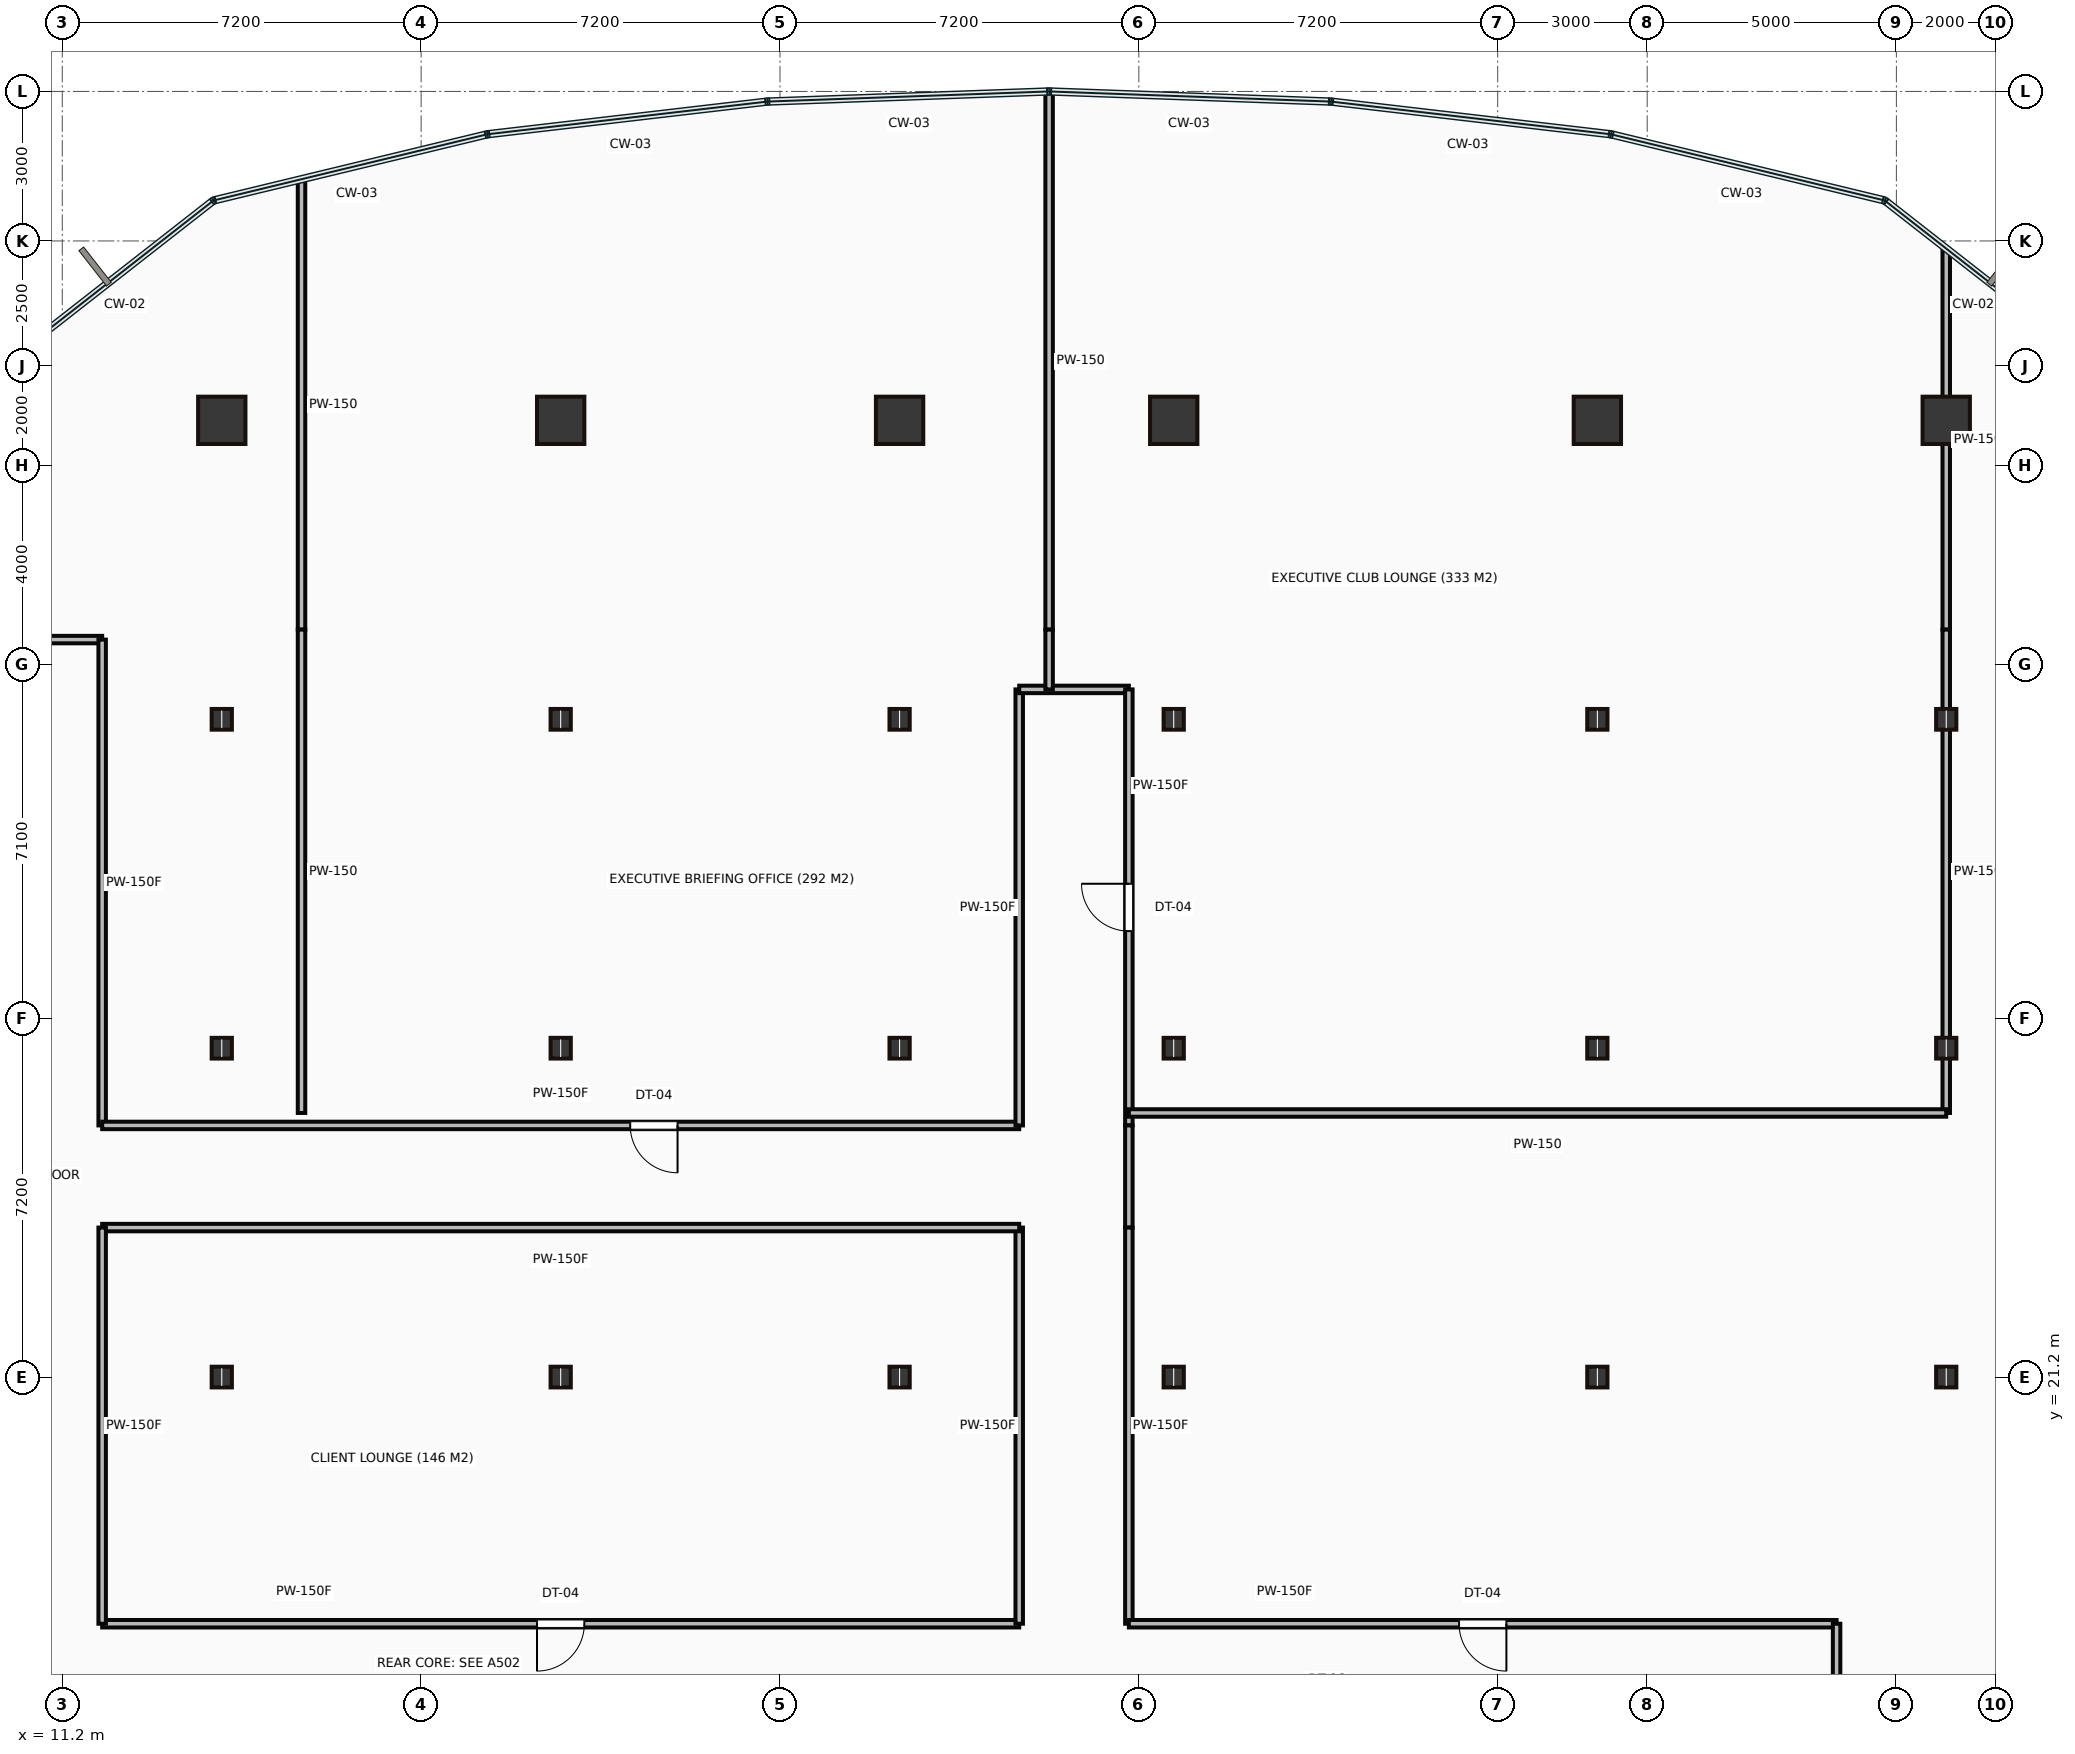
"""IFC4 building model, lengths in metres.
Left out: names, types, materials, properties, quantities, classifications, styles, units other than length and angle.
Written with IfcOpenShell. Run it as: python <this file> out.ifc"""

import sys

from ifc_helpers import new_model, si_unit, direction, frame, frame_2d, origin, origin_2d, place, context, subcontext, project, spatial, rectangle, hollow_rectangle, i_section, extrude, source, transform, mapped, element, fill, save


model = new_model("IFC4")
c1 = context("Model", 3, precision=1e-05, world=origin(), true_north=direction((0.0, 1.0)))
c2 = subcontext(c1, "Body", "Model", "MODEL_VIEW")
j1 = project(units=[si_unit("LENGTHUNIT", "METRE"), si_unit("PLANEANGLEUNIT", "RADIAN")], contexts=[c1])
p1 = place(None, origin())
s1 = spatial("IfcSite", under=j1, at=p1, CompositionType="ELEMENT")
p2 = place(p1, origin())
s2 = spatial("IfcBuilding", under=s1, at=p2, CompositionType="ELEMENT")
p3 = place(p2, frame((0.0, 0.0, 43.45)))
s3 = spatial("IfcBuildingStorey", under=s2, at=p3, CompositionType="ELEMENT", Elevation=43.45)
m1 = source(origin(), c2, "Body", "SweptSolid", [
    extrude(i_section(OverallWidth=0.406, OverallDepth=0.416, WebThickness=0.03, FlangeThickness=0.048, at=origin_2d()), origin(), (0.0, 0.0, 1.0), 3.65),
])
for number, where, z_axis, x_axis in (
    (1, (14.4, 21.2, 0.0), (0.0, 0.0, 1.0), (1.0, 0.0, 0.0)),
    (2, (14.4, 27.8, 0.0), (0.0, 0.0, 1.0), (1.0, 0.0, 0.0)),
    (3, (14.4, 34.4, 0.0), (0.0, 0.0, 1.0), (1.0, 0.0, 0.0)),
):
    element("IfcColumn", number, at=place(p3, frame(where, z_axis=z_axis, x_axis=x_axis)), inside=s3, PredefinedType="COLUMN", context=c2, shape_type="MappedRepresentation", body=[
        mapped(m1, transform((0.0, 0.0, 0.0))),
    ])
m2 = source(origin(), c2, "Body", "SweptSolid", [
    extrude(hollow_rectangle(XDim=0.95, YDim=0.95, WallThickness=0.045, at=origin_2d()), origin(), (0.0, 0.0, 1.0), 3.65),
])
p4 = place(p3, frame((14.4, 40.4, 0.0), z_axis=(0.0, 0.0, 1.0), x_axis=(1.0, 0.0, 0.0)))
e4 = element("IfcColumn", 4, at=p4, inside=s3, PredefinedType="COLUMN", context=c2, shape_type="MappedRepresentation", body=[
    mapped(m2, transform((0.0, 0.0, 0.0))),
])
for number, where, z_axis, x_axis in (
    (5, (21.2, 21.2, 0.0), (0.0, 0.0, 1.0), (1.0, 0.0, 0.0)),
    (6, (21.2, 27.8, 0.0), (0.0, 0.0, 1.0), (1.0, 0.0, 0.0)),
    (7, (21.2, 34.4, 0.0), (0.0, 0.0, 1.0), (1.0, 0.0, 0.0)),
):
    element("IfcColumn", number, at=place(p3, frame(where, z_axis=z_axis, x_axis=x_axis)), inside=s3, PredefinedType="COLUMN", context=c2, shape_type="MappedRepresentation", body=[
        mapped(m1, transform((0.0, 0.0, 0.0))),
    ])
p5 = place(p3, frame((21.2, 40.4, 0.0), z_axis=(0.0, 0.0, 1.0), x_axis=(1.0, 0.0, 0.0)))
e8 = element("IfcColumn", 8, at=p5, inside=s3, PredefinedType="COLUMN", context=c2, shape_type="MappedRepresentation", body=[
    mapped(m2, transform((0.0, 0.0, 0.0))),
])
for number, where, z_axis, x_axis in (
    (9, (28.0, 21.2, 0.0), (0.0, 0.0, 1.0), (1.0, 0.0, 0.0)),
    (10, (28.0, 27.8, 0.0), (0.0, 0.0, 1.0), (1.0, 0.0, 0.0)),
    (11, (28.0, 34.4, 0.0), (0.0, 0.0, 1.0), (1.0, 0.0, 0.0)),
):
    element("IfcColumn", number, at=place(p3, frame(where, z_axis=z_axis, x_axis=x_axis)), inside=s3, PredefinedType="COLUMN", context=c2, shape_type="MappedRepresentation", body=[
        mapped(m1, transform((0.0, 0.0, 0.0))),
    ])
p6 = place(p3, frame((28.0, 40.4, 0.0), z_axis=(0.0, 0.0, 1.0), x_axis=(1.0, 0.0, 0.0)))
e12 = element("IfcColumn", 12, at=p6, inside=s3, PredefinedType="COLUMN", context=c2, shape_type="MappedRepresentation", body=[
    mapped(m2, transform((0.0, 0.0, 0.0))),
])
for number, where, z_axis, x_axis in (
    (13, (33.5, 21.2, 0.0), (0.0, 0.0, 1.0), (1.0, 0.0, 0.0)),
    (14, (33.5, 27.8, 0.0), (0.0, 0.0, 1.0), (1.0, 0.0, 0.0)),
    (15, (33.5, 34.4, 0.0), (0.0, 0.0, 1.0), (1.0, 0.0, 0.0)),
):
    element("IfcColumn", number, at=place(p3, frame(where, z_axis=z_axis, x_axis=x_axis)), inside=s3, PredefinedType="COLUMN", context=c2, shape_type="MappedRepresentation", body=[
        mapped(m1, transform((0.0, 0.0, 0.0))),
    ])
p7 = place(p3, frame((33.5, 40.4, 0.0), z_axis=(0.0, 0.0, 1.0), x_axis=(1.0, 0.0, 0.0)))
e16 = element("IfcColumn", 16, at=p7, inside=s3, PredefinedType="COLUMN", context=c2, shape_type="MappedRepresentation", body=[
    mapped(m2, transform((0.0, 0.0, 0.0))),
])
for number, where, z_axis, x_axis in (
    (17, (42.0, 21.2, 0.0), (0.0, 0.0, 1.0), (1.0, 0.0, 0.0)),
    (18, (42.0, 27.8, 0.0), (0.0, 0.0, 1.0), (1.0, 0.0, 0.0)),
    (19, (42.0, 34.4, 0.0), (0.0, 0.0, 1.0), (1.0, 0.0, 0.0)),
):
    element("IfcColumn", number, at=place(p3, frame(where, z_axis=z_axis, x_axis=x_axis)), inside=s3, PredefinedType="COLUMN", context=c2, shape_type="MappedRepresentation", body=[
        mapped(m1, transform((0.0, 0.0, 0.0))),
    ])
p8 = place(p3, frame((42.0, 40.4, 0.0), z_axis=(0.0, 0.0, 1.0), x_axis=(1.0, 0.0, 0.0)))
e20 = element("IfcColumn", 20, at=p8, inside=s3, PredefinedType="COLUMN", context=c2, shape_type="MappedRepresentation", body=[
    mapped(m2, transform((0.0, 0.0, 0.0))),
])
for number, where, z_axis, x_axis in (
    (21, (49.0, 21.2, 0.0), (0.0, 0.0, 1.0), (1.0, 0.0, 0.0)),
    (22, (49.0, 27.8, 0.0), (0.0, 0.0, 1.0), (1.0, 0.0, 0.0)),
    (23, (49.0, 34.4, 0.0), (0.0, 0.0, 1.0), (1.0, 0.0, 0.0)),
):
    element("IfcColumn", number, at=place(p3, frame(where, z_axis=z_axis, x_axis=x_axis)), inside=s3, PredefinedType="COLUMN", context=c2, shape_type="MappedRepresentation", body=[
        mapped(m1, transform((0.0, 0.0, 0.0))),
    ])
p9 = place(p3, frame((49.0, 40.4, 0.0), z_axis=(0.0, 0.0, 1.0), x_axis=(1.0, 0.0, 0.0)))
e24 = element("IfcColumn", 24, at=p9, inside=s3, PredefinedType="COLUMN", context=c2, shape_type="MappedRepresentation", body=[
    mapped(m2, transform((0.0, 0.0, 0.0))),
])
m3 = source(origin(), c2, "Body", "SweptSolid", [
    extrude(rectangle(XDim=2.2, YDim=0.15, at=frame_2d((1.1, 0.0))), origin(), (0.0, 0.0, 1.0), 3.4),
])
p10 = place(p3, frame((9.8, 36.0, 0.0), z_axis=(0.0, 0.0, 1.0), x_axis=(1.0, 0.0, 0.0)))
e25 = element("IfcWall", 25, at=p10, inside=s3, PredefinedType="PARTITIONING", context=c2, shape_type="MappedRepresentation", body=[
    mapped(m3, transform((0.0, 0.0, 0.0))),
])
m4 = source(origin(), c2, "Body", "SweptSolid", [
    extrude(rectangle(XDim=9.75, YDim=0.15, at=frame_2d((4.875, 0.0))), origin(), (0.0, 0.0, 1.0), 3.4),
])
p11 = place(p3, frame((12.0, 36.0, 0.0), z_axis=(0.0, 0.0, 1.0), x_axis=(0.0, -1.0, 0.0)))
e26 = element("IfcWall", 26, at=p11, inside=s3, PredefinedType="PARTITIONING", context=c2, shape_type="MappedRepresentation", body=[
    mapped(m4, transform((0.0, 0.0, 0.0))),
])
m5 = source(origin(), c2, "Body", "SweptSolid", [
    extrude(rectangle(XDim=18.4, YDim=0.15, at=frame_2d((9.2, 0.0))), origin(), (0.0, 0.0, 1.0), 3.4),
])
p12 = place(p3, frame((12.0, 26.25, 0.0), z_axis=(0.0, 0.0, 1.0), x_axis=(1.0, 0.0, 0.0)))
e27 = element("IfcWall", 27, at=p12, inside=s3, PredefinedType="PARTITIONING", context=c2, shape_type="MappedRepresentation", body=[
    mapped(m5, transform((0.0, 0.0, 0.0))),
])
p13 = place(p12, frame((10.595, 0.0, 0.0)))
e28 = element("IfcOpeningElement", 28, at=p13, cuts=e27, PredefinedType="OPENING", context=c2, shape_type="SweptSolid", body=[
    extrude(rectangle(XDim=0.95, YDim=2.15, at=frame_2d((0.475, 1.075))), frame((0.0, 0.085, 0.0), z_axis=(0.0, -1.0, 0.0), x_axis=(1.0, 0.0, 0.0)), (0.0, 0.0, 1.0), 0.17),
])
m6 = source(origin(), c2, "Body", "SweptSolid", [
    extrude(rectangle(XDim=8.75, YDim=0.15, at=frame_2d((4.375, 0.0))), origin(), (0.0, 0.0, 1.0), 3.4),
])
p14 = place(p3, frame((30.4, 26.25, 0.0), z_axis=(0.0, 0.0, 1.0), x_axis=(0.0, 1.0, 0.0)))
e29 = element("IfcWall", 29, at=p14, inside=s3, PredefinedType="PARTITIONING", context=c2, shape_type="MappedRepresentation", body=[
    mapped(m6, transform((0.0, 0.0, 0.0))),
])
m7 = source(origin(), c2, "Body", "SweptSolid", [
    extrude(rectangle(XDim=2.2, YDim=0.15, at=frame_2d((1.1, 0.0))), origin(), (0.0, 0.0, 1.0), 3.4),
])
p15 = place(p3, frame((30.4, 35.0, 0.0), z_axis=(0.0, 0.0, 1.0), x_axis=(1.0, 0.0, 0.0)))
e30 = element("IfcWall", 30, at=p15, inside=s3, PredefinedType="PARTITIONING", context=c2, shape_type="MappedRepresentation", body=[
    mapped(m7, transform((0.0, 0.0, 0.0))),
])
p16 = place(p3, frame((32.6, 35.0, 0.0), z_axis=(0.0, 0.0, 1.0), x_axis=(0.0, -1.0, 0.0)))
e31 = element("IfcWall", 31, at=p16, inside=s3, PredefinedType="PARTITIONING", context=c2, shape_type="MappedRepresentation", body=[
    mapped(m6, transform((0.0, 0.0, 0.0))),
])
p17 = place(p16, frame((3.9, 0.0, 0.0)))
e32 = element("IfcOpeningElement", 32, at=p17, cuts=e31, PredefinedType="OPENING", context=c2, shape_type="SweptSolid", body=[
    extrude(rectangle(XDim=0.95, YDim=2.15, at=frame_2d((0.475, 1.075))), frame((0.0, 0.085, 0.0), z_axis=(0.0, -1.0, 0.0), x_axis=(1.0, 0.0, 0.0)), (0.0, 0.0, 1.0), 0.17),
])
m8 = source(origin(), c2, "Body", "SweptSolid", [
    extrude(rectangle(XDim=2.05, YDim=0.15, at=frame_2d((1.025, 0.0))), origin(), (0.0, 0.0, 1.0), 3.4),
])
p18 = place(p3, frame((32.6, 26.25, 0.0), z_axis=(0.0, 0.0, 1.0), x_axis=(0.0, -1.0, 0.0)))
e33 = element("IfcWall", 33, at=p18, inside=s3, PredefinedType="PARTITIONING", context=c2, shape_type="MappedRepresentation", body=[
    mapped(m8, transform((0.0, 0.0, 0.0))),
])
m9 = source(origin(), c2, "Body", "SweptSolid", [
    extrude(rectangle(XDim=7.95, YDim=0.15, at=frame_2d((3.975, 0.0))), origin(), (0.0, 0.0, 1.0), 3.4),
])
p19 = place(p3, frame((32.6, 24.2, 0.0), z_axis=(0.0, 0.0, 1.0), x_axis=(0.0, -1.0, 0.0)))
e34 = element("IfcWall", 34, at=p19, inside=s3, PredefinedType="PARTITIONING", context=c2, shape_type="MappedRepresentation", body=[
    mapped(m9, transform((0.0, 0.0, 0.0))),
])
m10 = source(origin(), c2, "Body", "SweptSolid", [
    extrude(rectangle(XDim=14.2, YDim=0.15, at=frame_2d((7.1, 0.0))), origin(), (0.0, 0.0, 1.0), 3.4),
])
p20 = place(p3, frame((32.6, 16.25, 0.0), z_axis=(0.0, 0.0, 1.0), x_axis=(1.0, 0.0, 0.0)))
e35 = element("IfcWall", 35, at=p20, inside=s3, PredefinedType="PARTITIONING", context=c2, shape_type="MappedRepresentation", body=[
    mapped(m10, transform((0.0, 0.0, 0.0))),
])
p21 = place(p20, frame((6.625, 0.0, 0.0)))
e36 = element("IfcOpeningElement", 36, at=p21, cuts=e35, PredefinedType="OPENING", context=c2, shape_type="SweptSolid", body=[
    extrude(rectangle(XDim=0.95, YDim=2.15, at=frame_2d((0.475, 1.075))), frame((0.0, 0.085, 0.0), z_axis=(0.0, -1.0, 0.0), x_axis=(1.0, 0.0, 0.0)), (0.0, 0.0, 1.0), 0.17),
])
m11 = source(origin(), c2, "Body", "SweptSolid", [
    extrude(rectangle(XDim=2.25, YDim=0.15, at=frame_2d((1.125, 0.0))), origin(), (0.0, 0.0, 1.0), 3.4),
])
p22 = place(p3, frame((46.8, 16.25, 0.0), z_axis=(0.0, 0.0, 1.0), x_axis=(0.0, -1.0, 0.0)))
e37 = element("IfcWall", 37, at=p22, inside=s3, PredefinedType="PARTITIONING", context=c2, shape_type="MappedRepresentation", body=[
    mapped(m11, transform((0.0, 0.0, 0.0))),
])
p23 = place(p3, frame((12.0, 16.25, 0.0), z_axis=(0.0, 0.0, 1.0), x_axis=(1.0, 0.0, 0.0)))
e38 = element("IfcWall", 38, at=p23, inside=s3, PredefinedType="PARTITIONING", context=c2, shape_type="MappedRepresentation", body=[
    mapped(m5, transform((0.0, 0.0, 0.0))),
])
p24 = place(p23, frame((8.725, 0.0, 0.0)))
e39 = element("IfcOpeningElement", 39, at=p24, cuts=e38, PredefinedType="OPENING", context=c2, shape_type="SweptSolid", body=[
    extrude(rectangle(XDim=0.95, YDim=2.15, at=frame_2d((0.475, 1.075))), frame((0.0, 0.085, 0.0), z_axis=(0.0, -1.0, 0.0), x_axis=(1.0, 0.0, 0.0)), (0.0, 0.0, 1.0), 0.17),
])
p25 = place(p3, frame((30.4, 16.25, 0.0), z_axis=(0.0, 0.0, 1.0), x_axis=(0.0, 1.0, 0.0)))
e40 = element("IfcWall", 40, at=p25, inside=s3, PredefinedType="PARTITIONING", context=c2, shape_type="MappedRepresentation", body=[
    mapped(m9, transform((0.0, 0.0, 0.0))),
])
p26 = place(p3, frame((30.4, 24.2, 0.0), z_axis=(0.0, 0.0, 1.0), x_axis=(-1.0, 0.0, 0.0)))
e41 = element("IfcWall", 41, at=p26, inside=s3, PredefinedType="PARTITIONING", context=c2, shape_type="MappedRepresentation", body=[
    mapped(m5, transform((0.0, 0.0, 0.0))),
])
p27 = place(p3, frame((12.0, 24.2, 0.0), z_axis=(0.0, 0.0, 1.0), x_axis=(0.0, -1.0, 0.0)))
e42 = element("IfcWall", 42, at=p27, inside=s3, PredefinedType="PARTITIONING", context=c2, shape_type="MappedRepresentation", body=[
    mapped(m9, transform((0.0, 0.0, 0.0))),
])
m12 = source(origin(), c2, "Body", "SweptSolid", [
    extrude(rectangle(XDim=9.018, YDim=0.15, at=frame_2d((4.509, 0.0))), origin(), (0.0, 0.0, 1.0), 3.4),
])
p28 = place(p3, frame((16.0, 45.218, 0.0), z_axis=(0.0, 0.0, 1.0), x_axis=(0.0, -1.0, 0.0)))
e43 = element("IfcWall", 43, at=p28, inside=s3, PredefinedType="PARTITIONING", context=c2, shape_type="MappedRepresentation", body=[
    mapped(m12, transform((0.0, 0.0, 0.0))),
])
m13 = source(origin(), c2, "Body", "SweptSolid", [
    extrude(rectangle(XDim=9.7, YDim=0.15, at=frame_2d((4.85, 0.0))), origin(), (0.0, 0.0, 1.0), 3.4),
])
p29 = place(p3, frame((16.0, 36.2, 0.0), z_axis=(0.0, 0.0, 1.0), x_axis=(0.0, -1.0, 0.0)))
e44 = element("IfcWall", 44, at=p29, inside=s3, PredefinedType="PARTITIONING", context=c2, shape_type="MappedRepresentation", body=[
    mapped(m13, transform((0.0, 0.0, 0.0))),
])
m14 = source(origin(), c2, "Body", "SweptSolid", [
    extrude(rectangle(XDim=10.78, YDim=0.15, at=frame_2d((5.39, 0.0))), origin(), (0.0, 0.0, 1.0), 3.4),
])
p30 = place(p3, frame((31.0, 46.98, 0.0), z_axis=(0.0, 0.0, 1.0), x_axis=(0.0, -1.0, 0.0)))
e45 = element("IfcWall", 45, at=p30, inside=s3, PredefinedType="PARTITIONING", context=c2, shape_type="MappedRepresentation", body=[
    mapped(m14, transform((0.0, 0.0, 0.0))),
])
m15 = source(origin(), c2, "Body", "SweptSolid", [
    extrude(rectangle(XDim=1.2, YDim=0.15, at=frame_2d((0.6, 0.0))), origin(), (0.0, 0.0, 1.0), 3.4),
])
p31 = place(p3, frame((31.0, 36.2, 0.0), z_axis=(0.0, 0.0, 1.0), x_axis=(0.0, -1.0, 0.0)))
e46 = element("IfcWall", 46, at=p31, inside=s3, PredefinedType="PARTITIONING", context=c2, shape_type="MappedRepresentation", body=[
    mapped(m15, transform((0.0, 0.0, 0.0))),
])
m16 = source(origin(), c2, "Body", "SweptSolid", [
    extrude(rectangle(XDim=7.621, YDim=0.15, at=frame_2d((3.811, 0.0))), origin(), (0.0, 0.0, 1.0), 2.625),
])
p32 = place(p3, frame((49.0, 43.821, 0.0), z_axis=(0.0, 0.0, 1.0), x_axis=(0.0, -1.0, 0.0)))
e47 = element("IfcWall", 47, at=p32, inside=s3, PredefinedType="PARTITIONING", context=c2, shape_type="MappedRepresentation", body=[
    mapped(m16, transform((0.0, 0.0, 0.0))),
])
m17 = source(origin(), c2, "Body", "SweptSolid", [
    extrude(rectangle(XDim=9.7, YDim=0.15, at=frame_2d((4.85, 0.0))), origin(), (0.0, 0.0, 1.0), 2.625),
])
p33 = place(p3, frame((49.0, 36.2, 0.0), z_axis=(0.0, 0.0, 1.0), x_axis=(0.0, -1.0, 0.0)))
e48 = element("IfcWall", 48, at=p33, inside=s3, PredefinedType="PARTITIONING", context=c2, shape_type="MappedRepresentation", body=[
    mapped(m17, transform((0.0, 0.0, 0.0))),
])
m18 = source(origin(), c2, "Body", "SweptSolid", [
    extrude(rectangle(XDim=16.4, YDim=0.15, at=frame_2d((8.2, 0.0))), origin(), (0.0, 0.0, 1.0), 3.4),
])
p34 = place(p3, frame((49.0, 26.5, 0.0), z_axis=(0.0, 0.0, 1.0), x_axis=(-1.0, 0.0, 0.0)))
e49 = element("IfcWall", 49, at=p34, inside=s3, PredefinedType="PARTITIONING", context=c2, shape_type="MappedRepresentation", body=[
    mapped(m18, transform((0.0, 0.0, 0.0))),
])
m19 = source(origin(), c2, "Body", "SweptSolid", [
    extrude(rectangle(XDim=0.95, YDim=2.15, at=frame_2d((0.475, 1.075))), frame((0.0, 0.025, 0.0), z_axis=(0.0, -1.0, 0.0), x_axis=(1.0, 0.0, 0.0)), (0.0, 0.0, 1.0), 0.05),
])
p35 = place(p24, origin())
e50 = element("IfcDoor", 50, at=p35, inside=s3, OperationType="SINGLE_SWING_LEFT", PredefinedType="DOOR", context=c2, shape_type="MappedRepresentation", body=[
    mapped(m19, transform((0.0, 0.0, 0.0))),
])
fill(e39, e50)
p36 = place(p13, origin())
e51 = element("IfcDoor", 51, at=p36, inside=s3, OperationType="SINGLE_SWING_RIGHT", PredefinedType="DOOR", context=c2, shape_type="MappedRepresentation", body=[
    mapped(m19, transform((0.0, 0.0, 0.0))),
])
fill(e28, e51)
p37 = place(p17, origin())
e52 = element("IfcDoor", 52, at=p37, inside=s3, OperationType="SINGLE_SWING_LEFT", PredefinedType="DOOR", context=c2, shape_type="MappedRepresentation", body=[
    mapped(m19, transform((0.0, 0.0, 0.0))),
])
fill(e32, e52)
p38 = place(p21, origin())
e53 = element("IfcDoor", 53, at=p38, inside=s3, OperationType="SINGLE_SWING_RIGHT", PredefinedType="DOOR", context=c2, shape_type="MappedRepresentation", body=[
    mapped(m19, transform((0.0, 0.0, 0.0))),
])
fill(e36, e53)
save(model, sys.argv[1])
